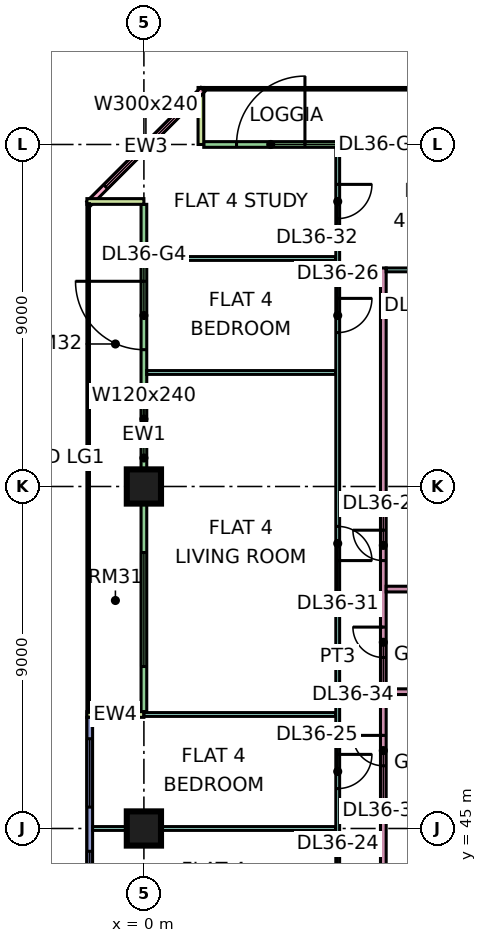
"""IFC4 building model, lengths in metres.
Left out: names, types, materials, properties, quantities, classifications, styles, units other than length and angle.
Written with IfcOpenShell. Run it as: python <this file> out.ifc"""

import sys

from ifc_helpers import new_model, si_unit, direction, frame, frame_2d, origin, origin_2d, place, context, subcontext, project, spatial, rectangle, extrude, element, fill, save


model = new_model("IFC4")
c1 = context("Model", 3, precision=1e-05, world=origin(), true_north=direction((0.0, 1.0)))
c2 = subcontext(c1, "Body", "Model", "MODEL_VIEW")
j1 = project(units=[si_unit("LENGTHUNIT", "METRE"), si_unit("PLANEANGLEUNIT", "RADIAN")], contexts=[c1])
p1 = place(None, origin())
s1 = spatial("IfcSite", under=j1, at=p1, CompositionType="ELEMENT")
p2 = place(p1, origin())
s2 = spatial("IfcBuilding", under=s1, at=p2, CompositionType="ELEMENT")
p3 = place(p2, frame((0.0, 0.0, 161.15)))
s3 = spatial("IfcBuildingStorey", under=s2, at=p3, CompositionType="ELEMENT", Elevation=161.15)
for number, where, z_axis, x_axis in (
    (1, (0.0, 45.0, 0.0), (0.0, 0.0, 1.0), (1.0, 0.0, 0.0)),
    (2, (0.0, 54.0, 0.0), (0.0, 0.0, 1.0), (1.0, 0.0, 0.0)),
):
    element("IfcColumn", number, at=place(p3, frame(where, z_axis=z_axis, x_axis=x_axis)), inside=s3, PredefinedType="COLUMN", context=c2, shape_type="SweptSolid", body=[
        extrude(rectangle(XDim=0.9, YDim=0.9, at=origin_2d()), origin(), (0.0, 0.0, 1.0), 3.75),
    ])
p4 = place(p3, frame((11.925, 63.0, 0.0), z_axis=(0.0, 0.0, 1.0), x_axis=(-1.0, 0.0, 0.0)))
e3 = element("IfcWall", 3, at=p4, inside=s3, PredefinedType="SOLIDWALL", context=c2, shape_type="SweptSolid", body=[
    extrude(rectangle(XDim=10.35, YDim=0.15, at=frame_2d((5.175, 0.0))), origin(), (0.0, 0.0, 1.0), 3.35),
])
p5 = place(p4, frame((7.688, 0.0, 0.0)))
e4 = element("IfcOpeningElement", 4, at=p5, cuts=e3, PredefinedType="OPENING", context=c2, shape_type="SweptSolid", body=[
    extrude(rectangle(XDim=1.8, YDim=2.4, at=frame_2d((0.9, 1.2))), frame((0.0, 0.085, 0.0), z_axis=(0.0, -1.0, 0.0), x_axis=(1.0, 0.0, 0.0)), (0.0, 0.0, 1.0), 0.17),
])
p6 = place(p3, frame((1.5, 64.5, 0.0), z_axis=(0.0, 0.0, 1.0), x_axis=(0.0, -1.0, 0.0)))
e5 = element("IfcWall", 5, at=p6, inside=s3, PredefinedType="SOLIDWALL", context=c2, shape_type="SweptSolid", body=[
    extrude(rectangle(XDim=1.5, YDim=0.15, at=frame_2d((0.75, 0.0))), origin(), (0.0, 0.0, 1.0), 3.35),
])
p7 = place(p3, frame((1.553, 64.447, 0.0), z_axis=(0.0, 0.0, 1.0), x_axis=(-0.707106781187, -0.707106781187, 0.0)))
e6 = element("IfcWall", 6, at=p7, inside=s3, PredefinedType="SOLIDWALL", context=c2, shape_type="SweptSolid", body=[
    extrude(rectangle(XDim=4.243, YDim=0.15, at=frame_2d((2.121, 0.0))), origin(), (0.0, 0.0, 1.0), 3.35),
])
p8 = place(p7, frame((0.621, 0.0, 0.45)))
e7 = element("IfcOpeningElement", 7, at=p8, cuts=e6, PredefinedType="OPENING", context=c2, shape_type="SweptSolid", body=[
    extrude(rectangle(XDim=3.0, YDim=2.4, at=frame_2d((1.5, 1.2))), frame((0.0, 0.085, 0.0), z_axis=(0.0, -1.0, 0.0), x_axis=(1.0, 0.0, 0.0)), (0.0, 0.0, 1.0), 0.17),
])
p9 = place(p3, frame((0.0, 61.425, 0.0), z_axis=(0.0, 0.0, 1.0), x_axis=(0.0, -1.0, 0.0)))
e8 = element("IfcWall", 8, at=p9, inside=s3, PredefinedType="SOLIDWALL", context=c2, shape_type="SweptSolid", body=[
    extrude(rectangle(XDim=13.35, YDim=0.15, at=frame_2d((6.675, 0.0))), origin(), (0.0, 0.0, 1.0), 3.35),
])
p10 = place(p9, frame((2.025, 0.0, 0.0)))
e9 = element("IfcOpeningElement", 9, at=p10, cuts=e8, PredefinedType="OPENING", context=c2, shape_type="SweptSolid", body=[
    extrude(rectangle(XDim=1.8, YDim=2.4, at=frame_2d((0.9, 1.2))), frame((0.0, 0.085, 0.0), z_axis=(0.0, -1.0, 0.0), x_axis=(1.0, 0.0, 0.0)), (0.0, 0.0, 1.0), 0.17),
])
p11 = place(p9, frame((5.05, 0.0, 0.45)))
e10 = element("IfcOpeningElement", 10, at=p11, cuts=e8, PredefinedType="OPENING", context=c2, shape_type="SweptSolid", body=[
    extrude(rectangle(XDim=1.2, YDim=2.4, at=frame_2d((0.6, 1.2))), frame((0.0, 0.085, 0.0), z_axis=(0.0, -1.0, 0.0), x_axis=(1.0, 0.0, 0.0)), (0.0, 0.0, 1.0), 0.17),
])
p12 = place(p9, frame((9.163, 0.0, 0.45)))
e11 = element("IfcOpeningElement", 11, at=p12, cuts=e8, PredefinedType="OPENING", context=c2, shape_type="SweptSolid", body=[
    extrude(rectangle(XDim=3.0, YDim=2.4, at=frame_2d((1.5, 1.2))), frame((0.0, 0.085, 0.0), z_axis=(0.0, -1.0, 0.0), x_axis=(1.0, 0.0, 0.0)), (0.0, 0.0, 1.0), 0.17),
])
for number, where, z_axis, x_axis in (
    (12, (-1.5, 61.5, 0.0), (0.0, 0.0, 1.0), (1.0, 0.0, 0.0)),
    (13, (-1.5, 48.0, 0.0), (0.0, 0.0, 1.0), (1.0, 0.0, 0.0)),
):
    element("IfcWall", number, at=place(p3, frame(where, z_axis=z_axis, x_axis=x_axis)), inside=s3, PredefinedType="SOLIDWALL", context=c2, shape_type="SweptSolid", body=[
        extrude(rectangle(XDim=1.5, YDim=0.15, at=frame_2d((0.75, 0.0))), origin(), (0.0, 0.0, 1.0), 3.35),
    ])
p13 = place(p3, frame((-1.425, 47.925, 0.0), z_axis=(0.0, 0.0, 1.0), x_axis=(0.0, -1.0, 0.0)))
e14 = element("IfcWall", 14, at=p13, inside=s3, PredefinedType="SOLIDWALL", context=c2, shape_type="SweptSolid", body=[
    extrude(rectangle(XDim=11.85, YDim=0.15, at=frame_2d((5.925, 0.0))), origin(), (0.0, 0.0, 1.0), 3.35),
])
p14 = place(p13, frame((0.562, 0.0, 0.45)))
e15 = element("IfcOpeningElement", 15, at=p14, cuts=e14, PredefinedType="OPENING", context=c2, shape_type="SweptSolid", body=[
    extrude(rectangle(XDim=1.8, YDim=2.4, at=frame_2d((0.9, 1.2))), frame((0.0, 0.085, 0.0), z_axis=(0.0, -1.0, 0.0), x_axis=(1.0, 0.0, 0.0)), (0.0, 0.0, 1.0), 0.17),
])
p15 = place(p13, frame((3.525, 0.0, 0.45)))
e16 = element("IfcOpeningElement", 16, at=p15, cuts=e14, PredefinedType="OPENING", context=c2, shape_type="SweptSolid", body=[
    extrude(rectangle(XDim=1.8, YDim=2.4, at=frame_2d((0.9, 1.2))), frame((0.0, 0.085, 0.0), z_axis=(0.0, -1.0, 0.0), x_axis=(1.0, 0.0, 0.0)), (0.0, 0.0, 1.0), 0.17),
])
p16 = place(p13, frame((6.525, 0.0, 0.45)))
e17 = element("IfcOpeningElement", 17, at=p16, cuts=e14, PredefinedType="OPENING", context=c2, shape_type="SweptSolid", body=[
    extrude(rectangle(XDim=1.8, YDim=2.4, at=frame_2d((0.9, 1.2))), frame((0.0, 0.085, 0.0), z_axis=(0.0, -1.0, 0.0), x_axis=(1.0, 0.0, 0.0)), (0.0, 0.0, 1.0), 0.17),
])
p17 = place(p13, frame((9.488, 0.0, 0.45)))
e18 = element("IfcOpeningElement", 18, at=p17, cuts=e14, PredefinedType="OPENING", context=c2, shape_type="SweptSolid", body=[
    extrude(rectangle(XDim=1.8, YDim=2.4, at=frame_2d((0.9, 1.2))), frame((0.0, 0.085, 0.0), z_axis=(0.0, -1.0, 0.0), x_axis=(1.0, 0.0, 0.0)), (0.0, 0.0, 1.0), 0.17),
])
p18 = place(p3, frame((-1.351, 45.0, 0.0), z_axis=(0.0, 0.0, 1.0), x_axis=(1.0, 0.0, 0.0)))
e19 = element("IfcWall", 19, at=p18, inside=s3, PredefinedType="PARTITIONING", context=c2, shape_type="SweptSolid", body=[
    extrude(rectangle(XDim=6.401, YDim=0.1, at=frame_2d((3.201, 0.0))), origin(), (0.0, 0.0, 1.0), 3.35),
])
p19 = place(p3, frame((0.0, 48.0, 0.0), z_axis=(0.0, 0.0, 1.0), x_axis=(1.0, 0.0, 0.0)))
e20 = element("IfcWall", 20, at=p19, inside=s3, PredefinedType="PARTITIONING", context=c2, shape_type="SweptSolid", body=[
    extrude(rectangle(XDim=5.05, YDim=0.1, at=frame_2d((2.525, 0.0))), origin(), (0.0, 0.0, 1.0), 3.35),
])
for number, where, z_axis, x_axis in (
    (21, (0.074, 57.0, 0.0), (0.0, 0.0, 1.0), (1.0, 0.0, 0.0)),
    (22, (0.074, 60.0, 0.0), (0.0, 0.0, 1.0), (1.0, 0.0, 0.0)),
):
    element("IfcWall", number, at=place(p3, frame(where, z_axis=z_axis, x_axis=x_axis)), inside=s3, PredefinedType="PARTITIONING", context=c2, shape_type="SweptSolid", body=[
        extrude(rectangle(XDim=4.976, YDim=0.1, at=frame_2d((2.488, 0.0))), origin(), (0.0, 0.0, 1.0), 3.35),
    ])
p20 = place(p3, frame((5.1, 36.1, 0.0), z_axis=(0.0, 0.0, 1.0), x_axis=(0.0, 1.0, 0.0)))
e23 = element("IfcWall", 23, at=p20, inside=s3, PredefinedType="PARTITIONING", context=c2, shape_type="SweptSolid", body=[
    extrude(rectangle(XDim=26.826, YDim=0.1, at=frame_2d((13.413, 0.0))), origin(), (0.0, 0.0, 1.0), 3.35),
])
p21 = place(p20, frame((0.95, 0.0, 0.0)))
e24 = element("IfcOpeningElement", 24, at=p21, cuts=e23, PredefinedType="OPENING", context=c2, shape_type="SweptSolid", body=[
    extrude(rectangle(XDim=0.9, YDim=2.1, at=frame_2d((0.45, 1.05))), frame((0.0, 0.06, 0.0), z_axis=(0.0, -1.0, 0.0), x_axis=(1.0, 0.0, 0.0)), (0.0, 0.0, 1.0), 0.12),
])
p22 = place(p20, frame((3.95, 0.0, 0.0)))
e25 = element("IfcOpeningElement", 25, at=p22, cuts=e23, PredefinedType="OPENING", context=c2, shape_type="SweptSolid", body=[
    extrude(rectangle(XDim=0.9, YDim=2.1, at=frame_2d((0.45, 1.05))), frame((0.0, 0.06, 0.0), z_axis=(0.0, -1.0, 0.0), x_axis=(1.0, 0.0, 0.0)), (0.0, 0.0, 1.0), 0.12),
])
p23 = place(p20, frame((6.95, 0.0, 0.0)))
e26 = element("IfcOpeningElement", 26, at=p23, cuts=e23, PredefinedType="OPENING", context=c2, shape_type="SweptSolid", body=[
    extrude(rectangle(XDim=0.9, YDim=2.1, at=frame_2d((0.45, 1.05))), frame((0.0, 0.06, 0.0), z_axis=(0.0, -1.0, 0.0), x_axis=(1.0, 0.0, 0.0)), (0.0, 0.0, 1.0), 0.12),
])
p24 = place(p20, frame((9.95, 0.0, 0.0)))
e27 = element("IfcOpeningElement", 27, at=p24, cuts=e23, PredefinedType="OPENING", context=c2, shape_type="SweptSolid", body=[
    extrude(rectangle(XDim=0.9, YDim=2.1, at=frame_2d((0.45, 1.05))), frame((0.0, 0.06, 0.0), z_axis=(0.0, -1.0, 0.0), x_axis=(1.0, 0.0, 0.0)), (0.0, 0.0, 1.0), 0.12),
])
p25 = place(p20, frame((21.95, 0.0, 0.0)))
e28 = element("IfcOpeningElement", 28, at=p25, cuts=e23, PredefinedType="OPENING", context=c2, shape_type="SweptSolid", body=[
    extrude(rectangle(XDim=0.9, YDim=2.1, at=frame_2d((0.45, 1.05))), frame((0.0, 0.06, 0.0), z_axis=(0.0, -1.0, 0.0), x_axis=(1.0, 0.0, 0.0)), (0.0, 0.0, 1.0), 0.12),
])
p26 = place(p20, frame((15.95, 0.0, 0.0)))
e29 = element("IfcOpeningElement", 29, at=p26, cuts=e23, PredefinedType="OPENING", context=c2, shape_type="SweptSolid", body=[
    extrude(rectangle(XDim=0.9, YDim=2.1, at=frame_2d((0.45, 1.05))), frame((0.0, 0.06, 0.0), z_axis=(0.0, -1.0, 0.0), x_axis=(1.0, 0.0, 0.0)), (0.0, 0.0, 1.0), 0.12),
])
p27 = place(p20, frame((24.95, 0.0, 0.0)))
e30 = element("IfcOpeningElement", 30, at=p27, cuts=e23, PredefinedType="OPENING", context=c2, shape_type="SweptSolid", body=[
    extrude(rectangle(XDim=0.9, YDim=2.1, at=frame_2d((0.45, 1.05))), frame((0.0, 0.06, 0.0), z_axis=(0.0, -1.0, 0.0), x_axis=(1.0, 0.0, 0.0)), (0.0, 0.0, 1.0), 0.12),
])
p28 = place(p3, frame((6.3, 36.1, 0.0), z_axis=(0.0, 0.0, 1.0), x_axis=(0.0, 1.0, 0.0)))
e31 = element("IfcWall", 31, at=p28, inside=s3, PredefinedType="PARTITIONING", context=c2, shape_type="SweptSolid", body=[
    extrude(rectangle(XDim=23.65, YDim=0.15, at=frame_2d((11.825, 0.0))), origin(), (0.0, 0.0, 1.0), 3.35),
])
p29 = place(p28, frame((15.95, 0.0, 0.0)))
e32 = element("IfcOpeningElement", 32, at=p29, cuts=e31, PredefinedType="OPENING", context=c2, shape_type="SweptSolid", body=[
    extrude(rectangle(XDim=0.8, YDim=2.1, at=frame_2d((0.4, 1.05))), frame((0.0, 0.085, 0.0), z_axis=(0.0, -1.0, 0.0), x_axis=(1.0, 0.0, 0.0)), (0.0, 0.0, 1.0), 0.17),
])
p30 = place(p28, frame((5.75, 0.0, 0.0)))
e33 = element("IfcOpeningElement", 33, at=p30, cuts=e31, PredefinedType="OPENING", context=c2, shape_type="SweptSolid", body=[
    extrude(rectangle(XDim=0.9, YDim=2.1, at=frame_2d((0.45, 1.05))), frame((0.0, 0.085, 0.0), z_axis=(0.0, -1.0, 0.0), x_axis=(1.0, 0.0, 0.0)), (0.0, 0.0, 1.0), 0.17),
])
p31 = place(p28, frame((0.95, 0.0, 0.0)))
e34 = element("IfcOpeningElement", 34, at=p31, cuts=e31, PredefinedType="OPENING", context=c2, shape_type="SweptSolid", body=[
    extrude(rectangle(XDim=0.8, YDim=2.1, at=frame_2d((0.4, 1.05))), frame((0.0, 0.085, 0.0), z_axis=(0.0, -1.0, 0.0), x_axis=(1.0, 0.0, 0.0)), (0.0, 0.0, 1.0), 0.17),
])
p32 = place(p28, frame((10.55, 0.0, 0.0)))
e35 = element("IfcOpeningElement", 35, at=p32, cuts=e31, PredefinedType="OPENING", context=c2, shape_type="SweptSolid", body=[
    extrude(rectangle(XDim=0.8, YDim=2.1, at=frame_2d((0.4, 1.05))), frame((0.0, 0.085, 0.0), z_axis=(0.0, -1.0, 0.0), x_axis=(1.0, 0.0, 0.0)), (0.0, 0.0, 1.0), 0.17),
])
p33 = place(p28, frame((13.4, 0.0, 0.0)))
e36 = element("IfcOpeningElement", 36, at=p33, cuts=e31, PredefinedType="OPENING", context=c2, shape_type="SweptSolid", body=[
    extrude(rectangle(XDim=0.8, YDim=2.1, at=frame_2d((0.4, 1.05))), frame((0.0, 0.085, 0.0), z_axis=(0.0, -1.0, 0.0), x_axis=(1.0, 0.0, 0.0)), (0.0, 0.0, 1.0), 0.17),
])
for number, where, z_axis, x_axis in (
    (37, (6.375, 45.6, 0.0), (0.0, 0.0, 1.0), (1.0, 0.0, 0.0)),
    (38, (6.375, 48.6, 0.0), (0.0, 0.0, 1.0), (1.0, 0.0, 0.0)),
    (39, (6.375, 51.3, 0.0), (0.0, 0.0, 1.0), (1.0, 0.0, 0.0)),
    (40, (6.375, 53.7, 0.0), (0.0, 0.0, 1.0), (1.0, 0.0, 0.0)),
):
    element("IfcWall", number, at=place(p3, frame(where, z_axis=z_axis, x_axis=x_axis)), inside=s3, PredefinedType="PARTITIONING", context=c2, shape_type="SweptSolid", body=[
        extrude(rectangle(XDim=3.125, YDim=0.15, at=frame_2d((1.562, 0.0))), origin(), (0.0, 0.0, 1.0), 3.35),
    ])
p34 = place(p3, frame((6.375, 59.7, 0.0), z_axis=(0.0, 0.0, 1.0), x_axis=(1.0, 0.0, 0.0)))
e41 = element("IfcWall", 41, at=p34, inside=s3, PredefinedType="PARTITIONING", context=c2, shape_type="SweptSolid", body=[
    extrude(rectangle(XDim=3.125, YDim=0.1, at=frame_2d((1.562, 0.0))), origin(), (0.0, 0.0, 1.0), 3.35),
])
p35 = place(p34, frame((1.125, 0.0, 0.0)))
e42 = element("IfcOpeningElement", 42, at=p35, cuts=e41, PredefinedType="OPENING", context=c2, shape_type="SweptSolid", body=[
    extrude(rectangle(XDim=0.9, YDim=2.1, at=frame_2d((0.45, 1.05))), frame((0.0, 0.06, 0.0), z_axis=(0.0, -1.0, 0.0), x_axis=(1.0, 0.0, 0.0)), (0.0, 0.0, 1.0), 0.12),
])
p36 = place(p5, frame((1.8, 0.0, 0.0), z_axis=(0.0, 0.0, 1.0), x_axis=(-1.0, 0.0, 0.0)))
e43 = element("IfcDoor", 43, at=p36, inside=s3, OperationType="DOUBLE_DOOR_SINGLE_SWING", PredefinedType="DOOR", context=c2, shape_type="SweptSolid", body=[
    extrude(rectangle(XDim=1.8, YDim=2.4, at=frame_2d((0.9, 1.2))), frame((0.0, 0.025, 0.0), z_axis=(0.0, -1.0, 0.0), x_axis=(1.0, 0.0, 0.0)), (0.0, 0.0, 1.0), 0.05),
])
fill(e4, e43)
p37 = place(p8, origin())
e44 = element("IfcWindow", 44, at=p37, inside=s3, PartitioningType="SINGLE_PANEL", PredefinedType="WINDOW", context=c2, shape_type="SweptSolid", body=[
    extrude(rectangle(XDim=3.0, YDim=2.4, at=frame_2d((1.5, 1.2))), frame((0.0, 0.03, 0.0), z_axis=(0.0, -1.0, 0.0), x_axis=(1.0, 0.0, 0.0)), (0.0, 0.0, 1.0), 0.06),
])
fill(e7, e44)
p38 = place(p10, frame((1.8, 0.0, 0.0), z_axis=(0.0, 0.0, 1.0), x_axis=(-1.0, 0.0, 0.0)))
e45 = element("IfcDoor", 45, at=p38, inside=s3, OperationType="DOUBLE_DOOR_SINGLE_SWING", PredefinedType="DOOR", context=c2, shape_type="SweptSolid", body=[
    extrude(rectangle(XDim=1.8, YDim=2.4, at=frame_2d((0.9, 1.2))), frame((0.0, 0.025, 0.0), z_axis=(0.0, -1.0, 0.0), x_axis=(1.0, 0.0, 0.0)), (0.0, 0.0, 1.0), 0.05),
])
fill(e9, e45)
p39 = place(p11, origin())
e46 = element("IfcWindow", 46, at=p39, inside=s3, PartitioningType="SINGLE_PANEL", PredefinedType="WINDOW", context=c2, shape_type="SweptSolid", body=[
    extrude(rectangle(XDim=1.2, YDim=2.4, at=frame_2d((0.6, 1.2))), frame((0.0, 0.03, 0.0), z_axis=(0.0, -1.0, 0.0), x_axis=(1.0, 0.0, 0.0)), (0.0, 0.0, 1.0), 0.06),
])
fill(e10, e46)
p40 = place(p12, origin())
e47 = element("IfcWindow", 47, at=p40, inside=s3, PartitioningType="SINGLE_PANEL", PredefinedType="WINDOW", context=c2, shape_type="SweptSolid", body=[
    extrude(rectangle(XDim=3.0, YDim=2.4, at=frame_2d((1.5, 1.2))), frame((0.0, 0.03, 0.0), z_axis=(0.0, -1.0, 0.0), x_axis=(1.0, 0.0, 0.0)), (0.0, 0.0, 1.0), 0.06),
])
fill(e11, e47)
p41 = place(p14, origin())
e48 = element("IfcWindow", 48, at=p41, inside=s3, PartitioningType="SINGLE_PANEL", PredefinedType="WINDOW", context=c2, shape_type="SweptSolid", body=[
    extrude(rectangle(XDim=1.8, YDim=2.4, at=frame_2d((0.9, 1.2))), frame((0.0, 0.03, 0.0), z_axis=(0.0, -1.0, 0.0), x_axis=(1.0, 0.0, 0.0)), (0.0, 0.0, 1.0), 0.06),
])
fill(e15, e48)
p42 = place(p15, origin())
e49 = element("IfcWindow", 49, at=p42, inside=s3, PartitioningType="SINGLE_PANEL", PredefinedType="WINDOW", context=c2, shape_type="SweptSolid", body=[
    extrude(rectangle(XDim=1.8, YDim=2.4, at=frame_2d((0.9, 1.2))), frame((0.0, 0.03, 0.0), z_axis=(0.0, -1.0, 0.0), x_axis=(1.0, 0.0, 0.0)), (0.0, 0.0, 1.0), 0.06),
])
fill(e16, e49)
p43 = place(p29, frame((0.8, 0.0, 0.0), z_axis=(0.0, 0.0, 1.0), x_axis=(-1.0, 0.0, 0.0)))
e50 = element("IfcDoor", 50, at=p43, inside=s3, OperationType="SINGLE_SWING_RIGHT", PredefinedType="DOOR", context=c2, shape_type="SweptSolid", body=[
    extrude(rectangle(XDim=0.8, YDim=2.1, at=frame_2d((0.4, 1.05))), frame((0.0, 0.025, 0.0), z_axis=(0.0, -1.0, 0.0), x_axis=(1.0, 0.0, 0.0)), (0.0, 0.0, 1.0), 0.05),
])
fill(e32, e50)
p44 = place(p24, origin())
e51 = element("IfcDoor", 51, at=p44, inside=s3, OperationType="SINGLE_SWING_RIGHT", PredefinedType="DOOR", context=c2, shape_type="SweptSolid", body=[
    extrude(rectangle(XDim=0.9, YDim=2.1, at=frame_2d((0.45, 1.05))), frame((0.0, 0.025, 0.0), z_axis=(0.0, -1.0, 0.0), x_axis=(1.0, 0.0, 0.0)), (0.0, 0.0, 1.0), 0.05),
])
fill(e27, e51)
p45 = place(p25, origin())
e52 = element("IfcDoor", 52, at=p45, inside=s3, OperationType="SINGLE_SWING_RIGHT", PredefinedType="DOOR", context=c2, shape_type="SweptSolid", body=[
    extrude(rectangle(XDim=0.9, YDim=2.1, at=frame_2d((0.45, 1.05))), frame((0.0, 0.025, 0.0), z_axis=(0.0, -1.0, 0.0), x_axis=(1.0, 0.0, 0.0)), (0.0, 0.0, 1.0), 0.05),
])
fill(e28, e52)
p46 = place(p26, frame((0.9, 0.0, 0.0), z_axis=(0.0, 0.0, 1.0), x_axis=(-1.0, 0.0, 0.0)))
e53 = element("IfcDoor", 53, at=p46, inside=s3, OperationType="SINGLE_SWING_LEFT", PredefinedType="DOOR", context=c2, shape_type="SweptSolid", body=[
    extrude(rectangle(XDim=0.9, YDim=2.1, at=frame_2d((0.45, 1.05))), frame((0.0, 0.025, 0.0), z_axis=(0.0, -1.0, 0.0), x_axis=(1.0, 0.0, 0.0)), (0.0, 0.0, 1.0), 0.05),
])
fill(e29, e53)
p47 = place(p27, origin())
e54 = element("IfcDoor", 54, at=p47, inside=s3, OperationType="SINGLE_SWING_RIGHT", PredefinedType="DOOR", context=c2, shape_type="SweptSolid", body=[
    extrude(rectangle(XDim=0.9, YDim=2.1, at=frame_2d((0.45, 1.05))), frame((0.0, 0.025, 0.0), z_axis=(0.0, -1.0, 0.0), x_axis=(1.0, 0.0, 0.0)), (0.0, 0.0, 1.0), 0.05),
])
fill(e30, e54)
p48 = place(p32, frame((0.8, 0.0, 0.0), z_axis=(0.0, 0.0, 1.0), x_axis=(-1.0, 0.0, 0.0)))
e55 = element("IfcDoor", 55, at=p48, inside=s3, OperationType="SINGLE_SWING_RIGHT", PredefinedType="DOOR", context=c2, shape_type="SweptSolid", body=[
    extrude(rectangle(XDim=0.8, YDim=2.1, at=frame_2d((0.4, 1.05))), frame((0.0, 0.025, 0.0), z_axis=(0.0, -1.0, 0.0), x_axis=(1.0, 0.0, 0.0)), (0.0, 0.0, 1.0), 0.05),
])
fill(e35, e55)
p49 = place(p33, frame((0.8, 0.0, 0.0), z_axis=(0.0, 0.0, 1.0), x_axis=(-1.0, 0.0, 0.0)))
e56 = element("IfcDoor", 56, at=p49, inside=s3, OperationType="SINGLE_SWING_RIGHT", PredefinedType="DOOR", context=c2, shape_type="SweptSolid", body=[
    extrude(rectangle(XDim=0.8, YDim=2.1, at=frame_2d((0.4, 1.05))), frame((0.0, 0.025, 0.0), z_axis=(0.0, -1.0, 0.0), x_axis=(1.0, 0.0, 0.0)), (0.0, 0.0, 1.0), 0.05),
])
fill(e36, e56)
save(model, sys.argv[1])
